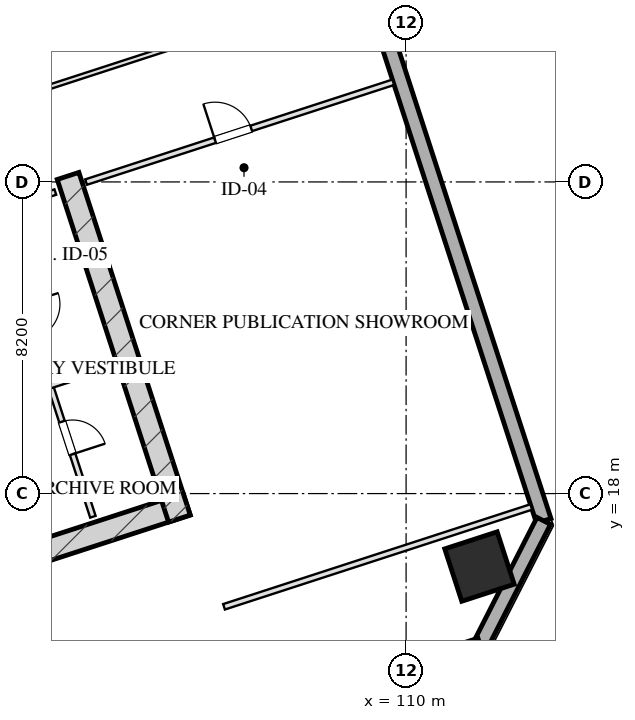
"""IFC4 building model, lengths in metres.
Left out: names, types, materials, properties, quantities, classifications, styles, units other than length and angle.
Written with IfcOpenShell. Run it as: python <this file> out.ifc"""

import sys

from ifc_helpers import new_model, si_unit, direction, frame, frame_2d, origin, origin_2d, place, context, subcontext, project, spatial, rectangle, hollow_rectangle, extrude, element, fill, save


model = new_model("IFC4")
c1 = context("Model", 3, precision=1e-05, world=origin(), true_north=direction((0.0, 1.0)))
c2 = subcontext(c1, "Body", "Model", "MODEL_VIEW")
j1 = project(units=[si_unit("LENGTHUNIT", "METRE"), si_unit("PLANEANGLEUNIT", "RADIAN")], contexts=[c1])
p1 = place(None, origin())
s1 = spatial("IfcSite", under=j1, at=p1, CompositionType="ELEMENT")
p2 = place(p1, origin())
s2 = spatial("IfcBuilding", under=s1, at=p2, CompositionType="ELEMENT")
p3 = place(p2, frame((0.0, 0.0, 117.3)))
s3 = spatial("IfcBuildingStorey", under=s2, at=p3, CompositionType="ELEMENT", Elevation=117.3)
p4 = place(p3, frame((88.63, 12.652, 0.0), z_axis=(0.0, 0.0, 1.0), x_axis=(0.95105714907, 0.309015046886, 0.0)))
e1 = element("IfcWall", 1, at=p4, inside=s3, PredefinedType="SHEAR", context=c2, shape_type="SweptSolid", body=[
    extrude(rectangle(XDim=16.4, YDim=0.6, at=frame_2d((8.2, 0.0))), origin(), (0.0, 0.0, 1.0), 3.45),
])
p5 = place(p3, frame((101.105, 26.358, 0.0), z_axis=(0.0, 0.0, 1.0), x_axis=(0.309010370028, -0.95105866865, 0.0)))
e2 = element("IfcWall", 2, at=p5, inside=s3, PredefinedType="SHEAR", context=c2, shape_type="SweptSolid", body=[
    extrude(rectangle(XDim=9.48, YDim=0.6, at=frame_2d((4.74, 0.0))), origin(), (0.0, 0.0, 1.0), 3.45),
])
p6 = place(p3, frame((111.931, 16.08, 0.0), z_axis=(0.0, 0.0, 1.0), x_axis=(0.951056516295, 0.309016994375, 0.0)))
e3 = element("IfcColumn", 3, at=p6, inside=s3, PredefinedType="COLUMN", context=c2, shape_type="SweptSolid", body=[
    extrude(hollow_rectangle(XDim=1.45, YDim=1.45, WallThickness=0.05, at=origin_2d()), origin(), (0.0, 0.0, 1.0), 3.451),
])
p7 = place(p3, frame((99.284, 61.41, 0.0), z_axis=(0.0, 0.0, 1.0), x_axis=(0.309017542002, -0.95105633836, 0.0)))
e4 = element("IfcWall", 4, at=p7, inside=s3, PredefinedType="SOLIDWALL", context=c2, shape_type="SweptSolid", body=[
    extrude(rectangle(XDim=46.4, YDim=0.4, at=frame_2d((23.2, 0.0))), origin(), (0.0, 0.0, 1.0), 2.61),
])
p8 = place(p3, frame((113.623, 17.281, 0.0), z_axis=(0.0, 0.0, 1.0), x_axis=(-0.454026238093, -0.890988313685, 0.0)))
e5 = element("IfcWall", 5, at=p8, inside=s3, PredefinedType="SOLIDWALL", context=c2, shape_type="SweptSolid", body=[
    extrude(rectangle(XDim=3.677, YDim=0.4, at=frame_2d((1.838, 0.0))), origin(), (0.0, 0.0, 1.0), 2.61),
])
p9 = place(p3, frame((111.953, 14.005, 0.0), z_axis=(0.0, 0.0, 1.0), x_axis=(-0.95105505922, -0.309021478754, 0.0)))
e6 = element("IfcWall", 6, at=p9, inside=s3, PredefinedType="SOLIDWALL", context=c2, shape_type="SweptSolid", body=[
    extrude(rectangle(XDim=29.4, YDim=0.4, at=frame_2d((14.7, 0.0))), origin(), (0.0, 0.0, 1.0), 2.61),
])
p10 = place(p3, frame((97.727, 24.944, 0.0), z_axis=(0.0, 0.0, 1.0), x_axis=(0.951036872128, 0.309077446369, 0.0)))
e7 = element("IfcWall", 7, at=p10, inside=s3, PredefinedType="PARTITIONING", context=c2, shape_type="SweptSolid", body=[
    extrude(rectangle(XDim=3.2, YDim=0.15, at=frame_2d((1.6, 0.0))), origin(), (0.0, 0.0, 1.0), 3.175),
])
p11 = place(p10, frame((0.22, 0.0, 0.0)))
e8 = element("IfcOpeningElement", 8, at=p11, cuts=e7, PredefinedType="OPENING", context=c2, shape_type="SweptSolid", body=[
    extrude(rectangle(XDim=0.95, YDim=2.05, at=frame_2d((0.475, 1.025))), frame((0.0, 0.085, 0.0), z_axis=(0.0, -1.0, 0.0), x_axis=(1.0, 0.0, 0.0)), (0.0, 0.0, 1.0), 0.17),
])
p12 = place(p3, frame((99.153, 25.408, 0.0), z_axis=(0.0, 0.0, 1.0), x_axis=(0.309016001439, -0.951056838919, 0.0)))
e9 = element("IfcWall", 9, at=p12, inside=s3, PredefinedType="PARTITIONING", context=c2, shape_type="SweptSolid", body=[
    extrude(rectangle(XDim=8.43, YDim=0.15, at=frame_2d((4.215, 0.0))), origin(), (0.0, 0.0, 1.0), 3.175),
])
p13 = place(p12, frame((2.55, 0.0, 0.0)))
e10 = element("IfcOpeningElement", 10, at=p13, cuts=e9, PredefinedType="OPENING", context=c2, shape_type="SweptSolid", body=[
    extrude(rectangle(XDim=0.95, YDim=2.05, at=frame_2d((0.475, 1.025))), frame((0.0, 0.085, 0.0), z_axis=(0.0, -1.0, 0.0), x_axis=(1.0, 0.0, 0.0)), (0.0, 0.0, 1.0), 0.17),
])
p14 = place(p12, frame((5.8, 0.0, 0.0)))
e11 = element("IfcOpeningElement", 11, at=p14, cuts=e9, PredefinedType="OPENING", context=c2, shape_type="SweptSolid", body=[
    extrude(rectangle(XDim=0.9, YDim=2.05, at=frame_2d((0.45, 1.025))), frame((0.0, 0.085, 0.0), z_axis=(0.0, -1.0, 0.0), x_axis=(1.0, 0.0, 0.0)), (0.0, 0.0, 1.0), 0.17),
])
p15 = place(p3, frame((100.636, 20.843, 0.0), z_axis=(0.0, 0.0, 1.0), x_axis=(0.951040401051, 0.309066587596, 0.0)))
e12 = element("IfcWall", 12, at=p15, inside=s3, PredefinedType="PARTITIONING", context=c2, shape_type="SweptSolid", body=[
    extrude(rectangle(XDim=1.7, YDim=0.15, at=frame_2d((0.85, 0.0))), origin(), (0.0, 0.0, 1.0), 3.175),
])
p16 = place(p3, frame((105.209, 15.021, 0.0), z_axis=(0.0, 0.0, 1.0), x_axis=(0.951054329824, 0.309023723562, 0.0)))
e13 = element("IfcWall", 13, at=p16, inside=s3, PredefinedType="PARTITIONING", context=c2, shape_type="SweptSolid", body=[
    extrude(rectangle(XDim=8.5, YDim=0.15, at=frame_2d((4.25, 0.0))), origin(), (0.0, 0.0, 1.0), 3.175),
])
p17 = place(p3, frame((101.578, 26.196, 0.0), z_axis=(0.0, 0.0, 1.0), x_axis=(0.951062770994, 0.308997743729, 0.0)))
e14 = element("IfcWall", 14, at=p17, inside=s3, PredefinedType="PARTITIONING", context=c2, shape_type="SweptSolid", body=[
    extrude(rectangle(XDim=8.5, YDim=0.15, at=frame_2d((4.25, 0.0))), origin(), (0.0, 0.0, 1.0), 3.175),
])
p18 = place(p17, frame((3.57, 0.0, 0.0)))
e15 = element("IfcOpeningElement", 15, at=p18, cuts=e14, PredefinedType="OPENING", context=c2, shape_type="SweptSolid", body=[
    extrude(rectangle(XDim=1.0, YDim=2.05, at=frame_2d((0.5, 1.025))), frame((0.0, 0.085, 0.0), z_axis=(0.0, -1.0, 0.0), x_axis=(1.0, 0.0, 0.0)), (0.0, 0.0, 1.0), 0.17),
])
p19 = place(p3, frame((95.995, 27.2, 0.0), z_axis=(0.0, 0.0, 1.0), x_axis=(0.951057589409, 0.309013691651, 0.0)))
e16 = element("IfcWall", 16, at=p19, inside=s3, PredefinedType="PARTITIONING", context=c2, shape_type="SweptSolid", body=[
    extrude(rectangle(XDim=13.5, YDim=0.12, at=frame_2d((6.75, 0.0))), origin(), (0.0, 0.0, 1.0), 3.175),
])
p20 = place(p14, origin())
e17 = element("IfcDoor", 17, at=p20, inside=s3, OperationType="SINGLE_SWING_RIGHT", PredefinedType="DOOR", context=c2, shape_type="SweptSolid", body=[
    extrude(rectangle(XDim=0.9, YDim=2.05, at=frame_2d((0.45, 1.025))), frame((0.0, 0.025, 0.0), z_axis=(0.0, -1.0, 0.0), x_axis=(1.0, 0.0, 0.0)), (0.0, 0.0, 1.0), 0.05),
])
fill(e11, e17)
p21 = place(p18, origin())
e18 = element("IfcDoor", 18, at=p21, inside=s3, OperationType="SINGLE_SWING_LEFT", PredefinedType="DOOR", context=c2, shape_type="SweptSolid", body=[
    extrude(rectangle(XDim=1.0, YDim=2.05, at=frame_2d((0.5, 1.025))), frame((0.0, 0.025, 0.0), z_axis=(0.0, -1.0, 0.0), x_axis=(1.0, 0.0, 0.0)), (0.0, 0.0, 1.0), 0.05),
])
fill(e15, e18)
save(model, sys.argv[1])
